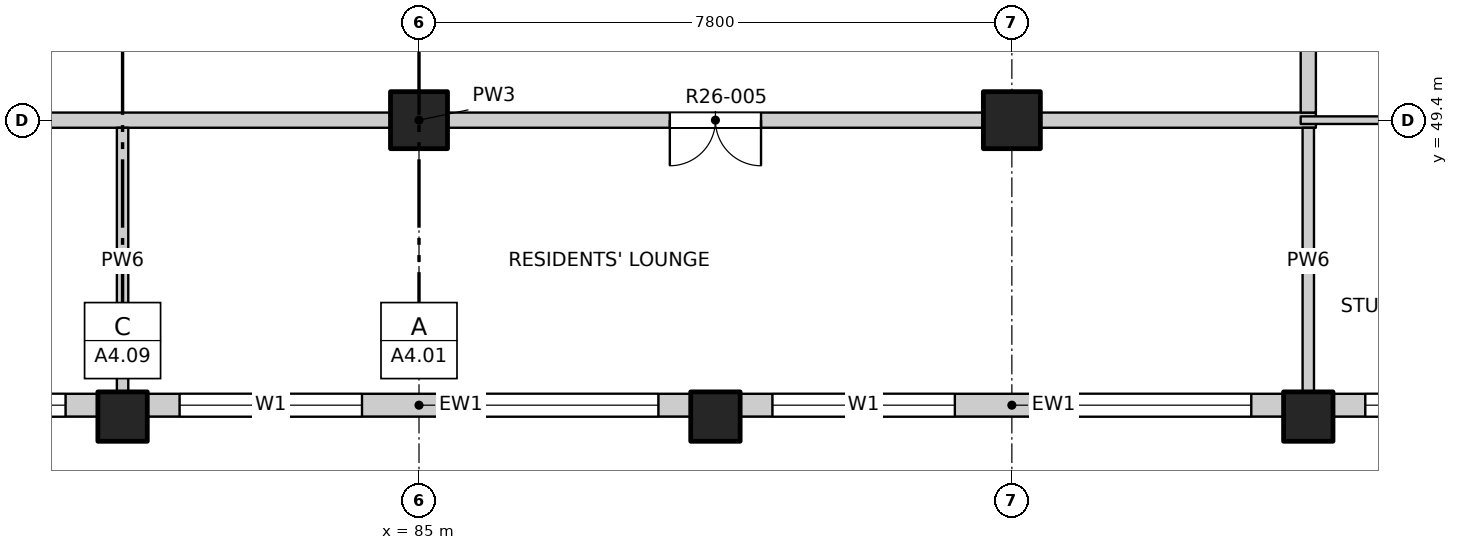
"""IFC4 building model, lengths in metres.
Left out: names, types, materials, properties, quantities, classifications, styles, units other than length and angle.
Written with IfcOpenShell. Run it as: python <this file> out.ifc"""

import sys

from ifc_helpers import new_model, si_unit, direction, frame, frame_2d, origin, origin_2d, place, context, subcontext, project, spatial, rectangle, extrude, element, fill, save


model = new_model("IFC4")
c1 = context("Model", 3, precision=1e-05, world=origin(), true_north=direction((0.0, 1.0)))
c2 = subcontext(c1, "Body", "Model", "MODEL_VIEW")
j1 = project(units=[si_unit("LENGTHUNIT", "METRE"), si_unit("PLANEANGLEUNIT", "RADIAN")], contexts=[c1])
p1 = place(None, origin())
s1 = spatial("IfcSite", under=j1, at=p1, CompositionType="ELEMENT")
p2 = place(p1, origin())
s2 = spatial("IfcBuilding", under=s1, at=p2, CompositionType="ELEMENT")
p3 = place(p2, frame((0.0, 0.0, 259.6)))
s3 = spatial("IfcBuildingStorey", under=s2, at=p3, CompositionType="ELEMENT", Elevation=259.6)
for number, where, z_axis, x_axis in (
    (1, (81.1, 45.5, -0.25), (0.0, 0.0, 1.0), (1.0, 0.0, 0.0)),
    (2, (88.9, 45.5, -0.25), (0.0, 0.0, 1.0), (1.0, 0.0, 0.0)),
    (3, (96.7, 45.5, -0.25), (0.0, 0.0, 1.0), (1.0, 0.0, 0.0)),
):
    element("IfcColumn", number, at=place(p3, frame(where, z_axis=z_axis, x_axis=x_axis)), inside=s3, PredefinedType="COLUMN", context=c2, shape_type="SweptSolid", body=[
        extrude(rectangle(XDim=0.65, YDim=0.65, at=origin_2d()), origin(), (0.0, 0.0, 1.0), 3.4),
    ])
for number, where, z_axis, x_axis in (
    (4, (85.0, 49.4, -0.25), (0.0, 0.0, 1.0), (1.0, 0.0, 0.0)),
    (5, (92.8, 49.4, -0.25), (0.0, 0.0, 1.0), (1.0, 0.0, 0.0)),
):
    element("IfcColumn", number, at=place(p3, frame(where, z_axis=z_axis, x_axis=x_axis)), inside=s3, PredefinedType="COLUMN", context=c2, shape_type="SweptSolid", body=[
        extrude(rectangle(XDim=0.75, YDim=0.75, at=origin_2d()), origin(), (0.0, 0.0, 1.0), 3.4),
    ])
p4 = place(p3, frame((73.625, 45.65, 0.0), z_axis=(0.0, 0.0, 1.0), x_axis=(1.0, 0.0, 0.0)))
e6 = element("IfcWall", 6, at=p4, inside=s3, PredefinedType="SOLIDWALL", context=c2, shape_type="SweptSolid", body=[
    extrude(rectangle(XDim=7.15, YDim=0.3, at=frame_2d((3.575, 0.0))), origin(), (0.0, 0.0, 1.0), 3.15),
])
p5 = place(p4, frame((0.425, 0.0, 0.9)))
e7 = element("IfcOpeningElement", 7, at=p5, cuts=e6, PredefinedType="OPENING", context=c2, shape_type="SweptSolid", body=[
    extrude(rectangle(XDim=2.4, YDim=1.8, at=frame_2d((1.2, 0.9))), frame((0.0, 0.16, 0.0), z_axis=(0.0, -1.0, 0.0), x_axis=(1.0, 0.0, 0.0)), (0.0, 0.0, 1.0), 0.32),
])
p6 = place(p4, frame((4.325, 0.0, 0.9)))
e8 = element("IfcOpeningElement", 8, at=p6, cuts=e6, PredefinedType="OPENING", context=c2, shape_type="SweptSolid", body=[
    extrude(rectangle(XDim=2.4, YDim=1.8, at=frame_2d((1.2, 0.9))), frame((0.0, 0.16, 0.0), z_axis=(0.0, -1.0, 0.0), x_axis=(1.0, 0.0, 0.0)), (0.0, 0.0, 1.0), 0.32),
])
p7 = place(p3, frame((81.425, 45.65, 0.0), z_axis=(0.0, 0.0, 1.0), x_axis=(1.0, 0.0, 0.0)))
e9 = element("IfcWall", 9, at=p7, inside=s3, PredefinedType="SOLIDWALL", context=c2, shape_type="SweptSolid", body=[
    extrude(rectangle(XDim=7.15, YDim=0.3, at=frame_2d((3.575, 0.0))), origin(), (0.0, 0.0, 1.0), 3.15),
])
p8 = place(p7, frame((0.425, 0.0, 0.9)))
e10 = element("IfcOpeningElement", 10, at=p8, cuts=e9, PredefinedType="OPENING", context=c2, shape_type="SweptSolid", body=[
    extrude(rectangle(XDim=2.4, YDim=1.8, at=frame_2d((1.2, 0.9))), frame((0.0, 0.16, 0.0), z_axis=(0.0, -1.0, 0.0), x_axis=(1.0, 0.0, 0.0)), (0.0, 0.0, 1.0), 0.32),
])
p9 = place(p7, frame((4.325, 0.0, 0.9)))
e11 = element("IfcOpeningElement", 11, at=p9, cuts=e9, PredefinedType="OPENING", context=c2, shape_type="SweptSolid", body=[
    extrude(rectangle(XDim=2.4, YDim=1.8, at=frame_2d((1.2, 0.9))), frame((0.0, 0.16, 0.0), z_axis=(0.0, -1.0, 0.0), x_axis=(1.0, 0.0, 0.0)), (0.0, 0.0, 1.0), 0.32),
])
p10 = place(p3, frame((89.225, 45.65, 0.0), z_axis=(0.0, 0.0, 1.0), x_axis=(1.0, 0.0, 0.0)))
e12 = element("IfcWall", 12, at=p10, inside=s3, PredefinedType="SOLIDWALL", context=c2, shape_type="SweptSolid", body=[
    extrude(rectangle(XDim=7.15, YDim=0.3, at=frame_2d((3.575, 0.0))), origin(), (0.0, 0.0, 1.0), 3.15),
])
p11 = place(p10, frame((0.425, 0.0, 0.9)))
e13 = element("IfcOpeningElement", 13, at=p11, cuts=e12, PredefinedType="OPENING", context=c2, shape_type="SweptSolid", body=[
    extrude(rectangle(XDim=2.4, YDim=1.8, at=frame_2d((1.2, 0.9))), frame((0.0, 0.16, 0.0), z_axis=(0.0, -1.0, 0.0), x_axis=(1.0, 0.0, 0.0)), (0.0, 0.0, 1.0), 0.32),
])
p12 = place(p10, frame((4.325, 0.0, 0.9)))
e14 = element("IfcOpeningElement", 14, at=p12, cuts=e12, PredefinedType="OPENING", context=c2, shape_type="SweptSolid", body=[
    extrude(rectangle(XDim=2.4, YDim=1.8, at=frame_2d((1.2, 0.9))), frame((0.0, 0.16, 0.0), z_axis=(0.0, -1.0, 0.0), x_axis=(1.0, 0.0, 0.0)), (0.0, 0.0, 1.0), 0.32),
])
p13 = place(p3, frame((97.025, 45.65, 0.0), z_axis=(0.0, 0.0, 1.0), x_axis=(1.0, 0.0, 0.0)))
e15 = element("IfcWall", 15, at=p13, inside=s3, PredefinedType="SOLIDWALL", context=c2, shape_type="SweptSolid", body=[
    extrude(rectangle(XDim=3.575, YDim=0.3, at=frame_2d((1.788, 0.0))), origin(), (0.0, 0.0, 1.0), 3.15),
])
p14 = place(p13, frame((0.425, 0.0, 0.9)))
e16 = element("IfcOpeningElement", 16, at=p14, cuts=e15, PredefinedType="OPENING", context=c2, shape_type="SweptSolid", body=[
    extrude(rectangle(XDim=2.4, YDim=1.8, at=frame_2d((1.2, 0.9))), frame((0.0, 0.16, 0.0), z_axis=(0.0, -1.0, 0.0), x_axis=(1.0, 0.0, 0.0)), (0.0, 0.0, 1.0), 0.32),
])
p15 = place(p3, frame((73.2, 49.4, 0.0), z_axis=(0.0, 0.0, 1.0), x_axis=(1.0, 0.0, 0.0)))
e17 = element("IfcWall", 17, at=p15, inside=s3, PredefinedType="PARTITIONING", context=c2, shape_type="SweptSolid", body=[
    extrude(rectangle(XDim=23.6, YDim=0.2, at=frame_2d((11.8, 0.0))), origin(), (0.0, 0.0, 1.0), 3.15),
])
p16 = place(p15, frame((2.325, 0.0, 0.0)))
e18 = element("IfcOpeningElement", 18, at=p16, cuts=e17, PredefinedType="OPENING", context=c2, shape_type="SweptSolid", body=[
    extrude(rectangle(XDim=1.2, YDim=2.1, at=frame_2d((0.6, 1.05))), frame((0.0, 0.11, 0.0), z_axis=(0.0, -1.0, 0.0), x_axis=(1.0, 0.0, 0.0)), (0.0, 0.0, 1.0), 0.22),
])
p17 = place(p15, frame((15.1, 0.0, 0.0)))
e19 = element("IfcOpeningElement", 19, at=p17, cuts=e17, PredefinedType="OPENING", context=c2, shape_type="SweptSolid", body=[
    extrude(rectangle(XDim=1.2, YDim=2.1, at=frame_2d((0.6, 1.05))), frame((0.0, 0.11, 0.0), z_axis=(0.0, -1.0, 0.0), x_axis=(1.0, 0.0, 0.0)), (0.0, 0.0, 1.0), 0.22),
])
p18 = place(p3, frame((96.6, 49.4, 0.0), z_axis=(0.0, 0.0, 1.0), x_axis=(1.0, 0.0, 0.0)))
e20 = element("IfcWall", 20, at=p18, inside=s3, PredefinedType="PARTITIONING", context=c2, shape_type="SweptSolid", body=[
    extrude(rectangle(XDim=7.6, YDim=0.1, at=frame_2d((3.8, 0.0))), origin(), (0.0, 0.0, 1.0), 3.15),
])
p19 = place(p18, frame((2.61, 0.0, 0.0)))
e21 = element("IfcOpeningElement", 21, at=p19, cuts=e20, PredefinedType="OPENING", context=c2, shape_type="SweptSolid", body=[
    extrude(rectangle(XDim=0.9, YDim=2.1, at=frame_2d((0.45, 1.05))), frame((0.0, 0.06, 0.0), z_axis=(0.0, -1.0, 0.0), x_axis=(1.0, 0.0, 0.0)), (0.0, 0.0, 1.0), 0.12),
])
for number, where, z_axis, x_axis in (
    (22, (81.1, 45.8, 0.0), (0.0, 0.0, 1.0), (0.0, 1.0, 0.0)),
    (23, (96.7, 45.8, 0.0), (0.0, 0.0, 1.0), (0.0, 1.0, 0.0)),
):
    element("IfcWall", number, at=place(p3, frame(where, z_axis=z_axis, x_axis=x_axis)), inside=s3, PredefinedType="PARTITIONING", context=c2, shape_type="SweptSolid", body=[
        extrude(rectangle(XDim=3.5, YDim=0.15, at=frame_2d((1.75, 0.0))), origin(), (0.0, 0.0, 1.0), 3.15),
    ])
p20 = place(p3, frame((96.7, 49.5, 0.0), z_axis=(0.0, 0.0, 1.0), x_axis=(0.0, 1.0, 0.0)))
e24 = element("IfcWall", 24, at=p20, inside=s3, PredefinedType="PARTITIONING", context=c2, shape_type="SweptSolid", body=[
    extrude(rectangle(XDim=34.7, YDim=0.2, at=frame_2d((17.35, 0.0))), origin(), (0.0, 0.0, 1.0), 3.15),
])
p21 = place(p20, frame((10.425, 0.0, 0.0)))
e25 = element("IfcOpeningElement", 25, at=p21, cuts=e24, PredefinedType="OPENING", context=c2, shape_type="SweptSolid", body=[
    extrude(rectangle(XDim=1.0, YDim=2.1, at=frame_2d((0.5, 1.05))), frame((0.0, 0.11, 0.0), z_axis=(0.0, -1.0, 0.0), x_axis=(1.0, 0.0, 0.0)), (0.0, 0.0, 1.0), 0.22),
])
p22 = place(p20, frame((29.225, 0.0, 0.0)))
e26 = element("IfcOpeningElement", 26, at=p22, cuts=e24, PredefinedType="OPENING", context=c2, shape_type="SweptSolid", body=[
    extrude(rectangle(XDim=1.0, YDim=2.1, at=frame_2d((0.5, 1.05))), frame((0.0, 0.11, 0.0), z_axis=(0.0, -1.0, 0.0), x_axis=(1.0, 0.0, 0.0)), (0.0, 0.0, 1.0), 0.22),
])
p23 = place(p6, origin())
e27 = element("IfcWindow", 27, at=p23, inside=s3, PartitioningType="DOUBLE_PANEL_VERTICAL", PredefinedType="WINDOW", context=c2, shape_type="SweptSolid", body=[
    extrude(rectangle(XDim=2.4, YDim=1.8, at=frame_2d((1.2, 0.9))), frame((0.0, 0.03, 0.0), z_axis=(0.0, -1.0, 0.0), x_axis=(1.0, 0.0, 0.0)), (0.0, 0.0, 1.0), 0.06),
])
fill(e8, e27)
p24 = place(p8, origin())
e28 = element("IfcWindow", 28, at=p24, inside=s3, PartitioningType="DOUBLE_PANEL_VERTICAL", PredefinedType="WINDOW", context=c2, shape_type="SweptSolid", body=[
    extrude(rectangle(XDim=2.4, YDim=1.8, at=frame_2d((1.2, 0.9))), frame((0.0, 0.03, 0.0), z_axis=(0.0, -1.0, 0.0), x_axis=(1.0, 0.0, 0.0)), (0.0, 0.0, 1.0), 0.06),
])
fill(e10, e28)
p25 = place(p9, origin())
e29 = element("IfcWindow", 29, at=p25, inside=s3, PartitioningType="DOUBLE_PANEL_VERTICAL", PredefinedType="WINDOW", context=c2, shape_type="SweptSolid", body=[
    extrude(rectangle(XDim=2.4, YDim=1.8, at=frame_2d((1.2, 0.9))), frame((0.0, 0.03, 0.0), z_axis=(0.0, -1.0, 0.0), x_axis=(1.0, 0.0, 0.0)), (0.0, 0.0, 1.0), 0.06),
])
fill(e11, e29)
p26 = place(p11, origin())
e30 = element("IfcWindow", 30, at=p26, inside=s3, PartitioningType="DOUBLE_PANEL_VERTICAL", PredefinedType="WINDOW", context=c2, shape_type="SweptSolid", body=[
    extrude(rectangle(XDim=2.4, YDim=1.8, at=frame_2d((1.2, 0.9))), frame((0.0, 0.03, 0.0), z_axis=(0.0, -1.0, 0.0), x_axis=(1.0, 0.0, 0.0)), (0.0, 0.0, 1.0), 0.06),
])
fill(e13, e30)
p27 = place(p12, origin())
e31 = element("IfcWindow", 31, at=p27, inside=s3, PartitioningType="DOUBLE_PANEL_VERTICAL", PredefinedType="WINDOW", context=c2, shape_type="SweptSolid", body=[
    extrude(rectangle(XDim=2.4, YDim=1.8, at=frame_2d((1.2, 0.9))), frame((0.0, 0.03, 0.0), z_axis=(0.0, -1.0, 0.0), x_axis=(1.0, 0.0, 0.0)), (0.0, 0.0, 1.0), 0.06),
])
fill(e14, e31)
p28 = place(p14, origin())
e32 = element("IfcWindow", 32, at=p28, inside=s3, PartitioningType="DOUBLE_PANEL_VERTICAL", PredefinedType="WINDOW", context=c2, shape_type="SweptSolid", body=[
    extrude(rectangle(XDim=2.4, YDim=1.8, at=frame_2d((1.2, 0.9))), frame((0.0, 0.03, 0.0), z_axis=(0.0, -1.0, 0.0), x_axis=(1.0, 0.0, 0.0)), (0.0, 0.0, 1.0), 0.06),
])
fill(e16, e32)
p29 = place(p17, origin())
e33 = element("IfcDoor", 33, at=p29, inside=s3, OperationType="DOUBLE_DOOR_SINGLE_SWING", PredefinedType="DOOR", context=c2, shape_type="SweptSolid", body=[
    extrude(rectangle(XDim=1.2, YDim=2.1, at=frame_2d((0.6, 1.05))), frame((0.0, 0.025, 0.0), z_axis=(0.0, -1.0, 0.0), x_axis=(1.0, 0.0, 0.0)), (0.0, 0.0, 1.0), 0.05),
])
fill(e19, e33)
save(model, sys.argv[1])
